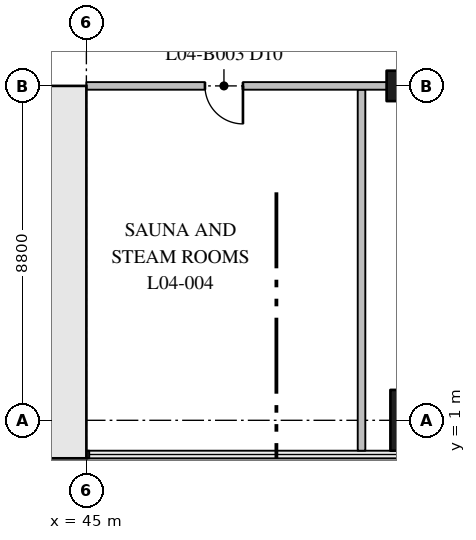
"""IFC4 building model, lengths in metres.
Left out: names, types, materials, properties, quantities, classifications, styles, units other than length and angle.
Written with IfcOpenShell. Run it as: python <this file> out.ifc"""

import sys

from ifc_helpers import new_model, si_unit, direction, frame, frame_2d, origin, origin_2d, place, context, subcontext, project, spatial, rectangle, extrude, element, fill, save


model = new_model("IFC4")
c1 = context("Model", 3, precision=1e-05, world=origin(), true_north=direction((0.0, 1.0)))
c2 = subcontext(c1, "Body", "Model", "MODEL_VIEW")
j1 = project(units=[si_unit("LENGTHUNIT", "METRE"), si_unit("PLANEANGLEUNIT", "RADIAN")], contexts=[c1])
p1 = place(None, origin())
s1 = spatial("IfcSite", under=j1, at=p1, CompositionType="ELEMENT")
p2 = place(p1, origin())
s2 = spatial("IfcBuilding", under=s1, at=p2, CompositionType="ELEMENT")
p3 = place(p2, frame((0.0, 0.0, 23.5)))
s3 = spatial("IfcBuildingStorey", under=s2, at=p3, CompositionType="ELEMENT", Elevation=23.5)
p4 = place(p3, frame((53.8, 1.0, 0.0), z_axis=(0.0, 0.0, 1.0), x_axis=(1.0, 0.0, 0.0)))
e1 = element("IfcColumn", 1, at=p4, inside=s3, PredefinedType="COLUMN", context=c2, shape_type="SweptSolid", body=[
    extrude(rectangle(XDim=1.6, YDim=1.6, at=origin_2d()), origin(), (0.0, 0.0, 1.0), 5.5),
])
p5 = place(p3, frame((53.8, 9.8, 0.0), z_axis=(0.0, 0.0, 1.0), x_axis=(1.0, 0.0, 0.0)))
e2 = element("IfcColumn", 2, at=p5, inside=s3, PredefinedType="COLUMN", context=c2, shape_type="SweptSolid", body=[
    extrude(rectangle(XDim=1.8, YDim=0.8, at=origin_2d()), origin(), (0.0, 0.0, 1.0), 5.5),
])
p6 = place(p3, frame((9.8, 0.6, 0.0), z_axis=(0.0, 0.0, 1.0), x_axis=(1.0, 0.0, 0.0)))
e3 = element("IfcWall", 3, at=p6, inside=s3, PredefinedType="SHEAR", context=c2, shape_type="SweptSolid", body=[
    extrude(rectangle(XDim=35.2, YDim=1.2, at=frame_2d((17.6, 0.0))), origin(), (0.0, 0.0, 1.0), 5.5),
])
p7 = place(p3, frame((44.4, 1.2, 0.0), z_axis=(0.0, 0.0, 1.0), x_axis=(0.0, 1.0, 0.0)))
e4 = element("IfcWall", 4, at=p7, inside=s3, PredefinedType="SHEAR", context=c2, shape_type="SweptSolid", body=[
    extrude(rectangle(XDim=8.6, YDim=1.2, at=frame_2d((4.3, 0.0))), origin(), (0.0, 0.0, 1.0), 5.5),
])
p8 = place(p3, frame((40.7, 9.6, 0.0), z_axis=(0.0, 0.0, 1.0), x_axis=(1.0, 0.0, 0.0)))
e5 = element("IfcWall", 5, at=p8, inside=s3, PredefinedType="SHEAR", context=c2, shape_type="SweptSolid", body=[
    extrude(rectangle(XDim=4.3, YDim=0.4, at=frame_2d((2.15, 0.0))), origin(), (0.0, 0.0, 1.0), 5.5),
])
p9 = place(p8, frame((1.05, 0.0, 0.0)))
e6 = element("IfcOpeningElement", 6, at=p9, cuts=e5, PredefinedType="OPENING", context=c2, shape_type="SweptSolid", body=[
    extrude(rectangle(XDim=1.2, YDim=2.1, at=frame_2d((0.6, 1.05))), frame((0.0, 0.21, 0.0), z_axis=(0.0, -1.0, 0.0), x_axis=(1.0, 0.0, 0.0)), (0.0, 0.0, 1.0), 0.42),
])
p10 = place(p3, frame((45.0, 9.8, 0.0), z_axis=(0.0, 0.0, 1.0), x_axis=(1.0, 0.0, 0.0)))
e7 = element("IfcWall", 7, at=p10, inside=s3, PredefinedType="PARTITIONING", context=c2, shape_type="SweptSolid", body=[
    extrude(rectangle(XDim=19.4, YDim=0.2, at=frame_2d((9.7, 0.0))), origin(), (0.0, 0.0, 1.0), 5.1),
])
p11 = place(p10, frame((3.12, 0.0, 0.0)))
e8 = element("IfcOpeningElement", 8, at=p11, cuts=e7, PredefinedType="OPENING", context=c2, shape_type="SweptSolid", body=[
    extrude(rectangle(XDim=1.0, YDim=2.1, at=frame_2d((0.5, 1.05))), frame((0.0, 0.11, 0.0), z_axis=(0.0, -1.0, 0.0), x_axis=(1.0, 0.0, 0.0)), (0.0, 0.0, 1.0), 0.22),
])
p12 = place(p10, frame((12.82, 0.0, 0.0)))
e9 = element("IfcOpeningElement", 9, at=p12, cuts=e7, PredefinedType="OPENING", context=c2, shape_type="SweptSolid", body=[
    extrude(rectangle(XDim=1.0, YDim=2.1, at=frame_2d((0.5, 1.05))), frame((0.0, 0.11, 0.0), z_axis=(0.0, -1.0, 0.0), x_axis=(1.0, 0.0, 0.0)), (0.0, 0.0, 1.0), 0.22),
])
p13 = place(p3, frame((52.24, 0.2, 0.0), z_axis=(0.0, 0.0, 1.0), x_axis=(0.0, 1.0, 0.0)))
e10 = element("IfcWall", 10, at=p13, inside=s3, PredefinedType="PARTITIONING", context=c2, shape_type="SweptSolid", body=[
    extrude(rectangle(XDim=9.5, YDim=0.2, at=frame_2d((4.75, 0.0))), origin(), (0.0, 0.0, 1.0), 5.1),
])
p14 = place(p11, frame((1.0, 0.0, 0.0), z_axis=(0.0, 0.0, 1.0), x_axis=(-1.0, 0.0, 0.0)))
e11 = element("IfcDoor", 11, at=p14, inside=s3, OperationType="SINGLE_SWING_RIGHT", PredefinedType="DOOR", context=c2, shape_type="SweptSolid", body=[
    extrude(rectangle(XDim=1.0, YDim=2.1, at=frame_2d((0.5, 1.05))), frame((0.0, 0.025, 0.0), z_axis=(0.0, -1.0, 0.0), x_axis=(1.0, 0.0, 0.0)), (0.0, 0.0, 1.0), 0.05),
])
fill(e8, e11)
save(model, sys.argv[1])
